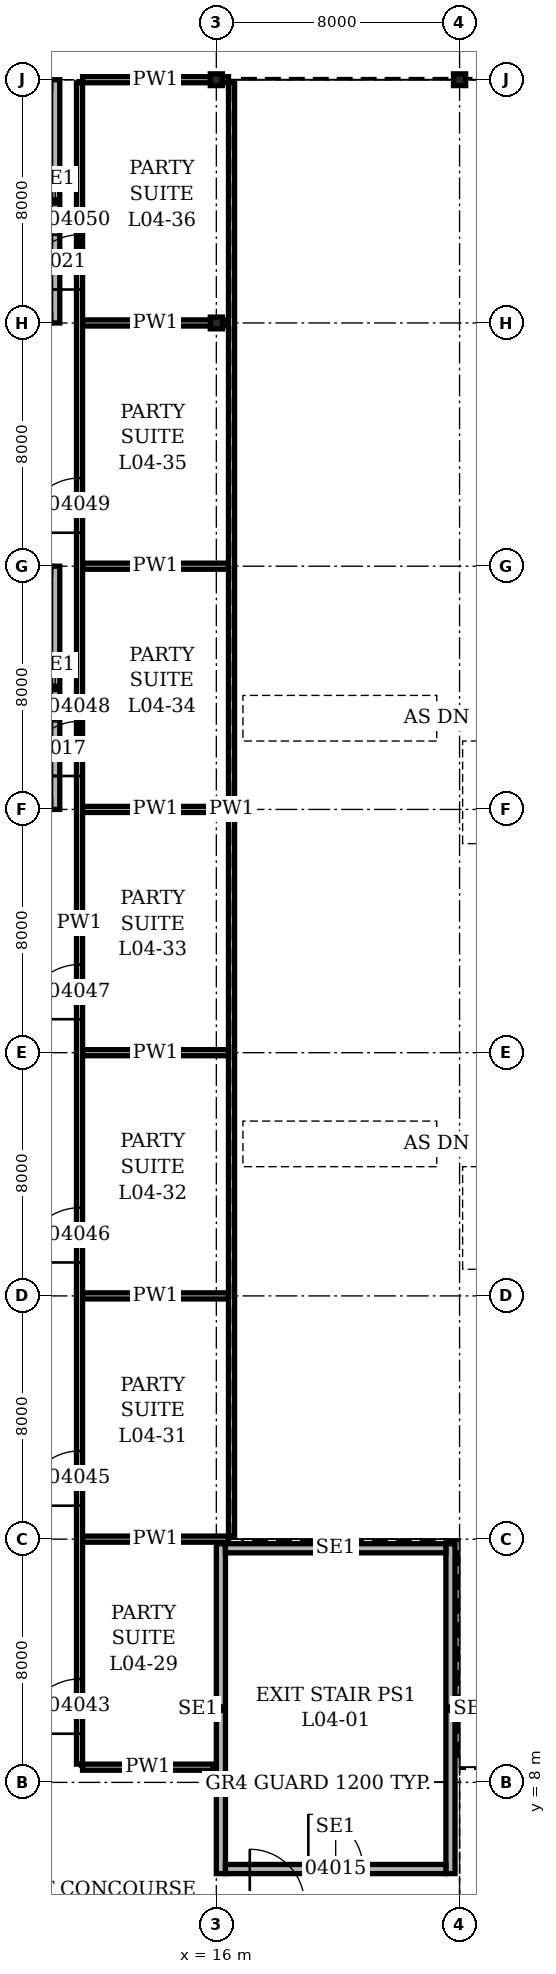
"""IFC4 building model, lengths in metres.
Left out: names, types, materials, properties, quantities, classifications, styles, units other than length and angle.
Written with IfcOpenShell. Run it as: python <this file> out.ifc"""

import sys

from ifc_helpers import new_model, si_unit, direction, frame, frame_2d, origin, origin_2d, place, context, subcontext, project, spatial, rectangle, i_section, extrude, element, fill, save


model = new_model("IFC4")
c1 = context("Model", 3, precision=1e-05, world=origin(), true_north=direction((0.0, 1.0)))
c2 = subcontext(c1, "Body", "Model", "MODEL_VIEW")
j1 = project(units=[si_unit("LENGTHUNIT", "METRE"), si_unit("PLANEANGLEUNIT", "RADIAN")], contexts=[c1])
p1 = place(None, origin())
s1 = spatial("IfcSite", under=j1, at=p1, CompositionType="ELEMENT")
p2 = place(p1, origin())
s2 = spatial("IfcBuilding", under=s1, at=p2, CompositionType="ELEMENT")
p3 = place(p2, frame((0.0, 0.0, 19.9)))
s3 = spatial("IfcBuildingStorey", under=s2, at=p3, CompositionType="ELEMENT", Elevation=19.9)
for number, where, z_axis, x_axis in (
    (1, (16.0, 56.0, 0.0), (0.0, 0.0, 1.0), (1.0, 0.0, 0.0)),
    (2, (16.0, 64.0, 0.0), (0.0, 0.0, 1.0), (1.0, 0.0, 0.0)),
    (3, (24.0, 64.0, 0.0), (0.0, 0.0, 1.0), (1.0, 0.0, 0.0)),
):
    element("IfcColumn", number, at=place(p3, frame(where, z_axis=z_axis, x_axis=x_axis)), inside=s3, PredefinedType="COLUMN", context=c2, shape_type="SweptSolid", body=[
        extrude(i_section(OverallWidth=0.399, OverallDepth=0.386, WebThickness=0.021, FlangeThickness=0.033, at=origin_2d()), origin(), (0.0, 0.0, 1.0), 6.0),
    ])
for number, where, z_axis, x_axis in (
    (4, (16.15, 5.0, 0.0), (0.0, 0.0, 1.0), (0.0, 1.0, 0.0)),
    (5, (23.7, 5.0, 0.0), (0.0, 0.0, 1.0), (0.0, 1.0, 0.0)),
):
    element("IfcWall", number, at=place(p3, frame(where, z_axis=z_axis, x_axis=x_axis)), inside=s3, PredefinedType="SOLIDWALL", context=c2, shape_type="SweptSolid", body=[
        extrude(rectangle(XDim=10.85, YDim=0.3, at=frame_2d((5.425, 0.0))), origin(), (0.0, 0.0, 1.0), 5.75),
    ])
p4 = place(p3, frame((16.3, 5.15, 0.0), z_axis=(0.0, 0.0, 1.0), x_axis=(1.0, 0.0, 0.0)))
e6 = element("IfcWall", 6, at=p4, inside=s3, PredefinedType="SOLIDWALL", context=c2, shape_type="SweptSolid", body=[
    extrude(rectangle(XDim=7.25, YDim=0.3, at=frame_2d((3.625, 0.0))), origin(), (0.0, 0.0, 1.0), 5.75),
])
p5 = place(p4, frame((2.725, 0.0, 0.0)))
e7 = element("IfcOpeningElement", 7, at=p5, cuts=e6, PredefinedType="OPENING", context=c2, shape_type="SweptSolid", body=[
    extrude(rectangle(XDim=1.8, YDim=2.1, at=frame_2d((0.9, 1.05))), frame((0.0, 0.16, 0.0), z_axis=(0.0, -1.0, 0.0), x_axis=(1.0, 0.0, 0.0)), (0.0, 0.0, 1.0), 0.32),
])
p6 = place(p3, frame((16.3, 15.7, 0.0), z_axis=(0.0, 0.0, 1.0), x_axis=(1.0, 0.0, 0.0)))
e8 = element("IfcWall", 8, at=p6, inside=s3, PredefinedType="SOLIDWALL", context=c2, shape_type="SweptSolid", body=[
    extrude(rectangle(XDim=7.25, YDim=0.3, at=frame_2d((3.625, 0.0))), origin(), (0.0, 0.0, 1.0), 5.75),
])
p7 = place(p3, frame((10.7, 40.0, 0.0), z_axis=(0.0, 0.0, 1.0), x_axis=(0.0, 1.0, 0.0)))
e9 = element("IfcWall", 9, at=p7, inside=s3, PredefinedType="SOLIDWALL", context=c2, shape_type="SweptSolid", body=[
    extrude(rectangle(XDim=8.0, YDim=0.3, at=frame_2d((4.0, 0.0))), origin(), (0.0, 0.0, 1.0), 5.75),
])
p8 = place(p7, frame((1.1, 0.0, 0.0)))
e10 = element("IfcOpeningElement", 10, at=p8, cuts=e9, PredefinedType="OPENING", context=c2, shape_type="SweptSolid", body=[
    extrude(rectangle(XDim=1.8, YDim=2.1, at=frame_2d((0.9, 1.05))), frame((0.0, 0.16, 0.0), z_axis=(0.0, -1.0, 0.0), x_axis=(1.0, 0.0, 0.0)), (0.0, 0.0, 1.0), 0.32),
])
p9 = place(p3, frame((10.7, 56.0, 0.0), z_axis=(0.0, 0.0, 1.0), x_axis=(0.0, 1.0, 0.0)))
e11 = element("IfcWall", 11, at=p9, inside=s3, PredefinedType="SOLIDWALL", context=c2, shape_type="SweptSolid", body=[
    extrude(rectangle(XDim=8.0, YDim=0.3, at=frame_2d((4.0, 0.0))), origin(), (0.0, 0.0, 1.0), 5.75),
])
p10 = place(p9, frame((1.1, 0.0, 0.0)))
e12 = element("IfcOpeningElement", 12, at=p10, cuts=e11, PredefinedType="OPENING", context=c2, shape_type="SweptSolid", body=[
    extrude(rectangle(XDim=1.8, YDim=2.1, at=frame_2d((0.9, 1.05))), frame((0.0, 0.16, 0.0), z_axis=(0.0, -1.0, 0.0), x_axis=(1.0, 0.0, 0.0)), (0.0, 0.0, 1.0), 0.32),
])
p11 = place(p3, frame((11.6, 8.5, 0.0), z_axis=(0.0, 0.0, 1.0), x_axis=(1.0, 0.0, 0.0)))
e13 = element("IfcWall", 13, at=p11, inside=s3, PredefinedType="PARTITIONING", context=c2, shape_type="SweptSolid", body=[
    extrude(rectangle(XDim=4.3, YDim=0.2, at=frame_2d((2.15, 0.0))), origin(), (0.0, 0.0, 1.0), 5.75),
])
for number, where, z_axis, x_axis in (
    (14, (11.6, 16.0, 0.0), (0.0, 0.0, 1.0), (1.0, 0.0, 0.0)),
    (15, (11.6, 24.0, 0.0), (0.0, 0.0, 1.0), (1.0, 0.0, 0.0)),
    (16, (11.6, 32.0, 0.0), (0.0, 0.0, 1.0), (1.0, 0.0, 0.0)),
    (17, (11.6, 40.0, 0.0), (0.0, 0.0, 1.0), (1.0, 0.0, 0.0)),
    (18, (11.6, 48.0, 0.0), (0.0, 0.0, 1.0), (1.0, 0.0, 0.0)),
):
    element("IfcWall", number, at=place(p3, frame(where, z_axis=z_axis, x_axis=x_axis)), inside=s3, PredefinedType="PARTITIONING", context=c2, shape_type="SweptSolid", body=[
        extrude(rectangle(XDim=4.8, YDim=0.2, at=frame_2d((2.4, 0.0))), origin(), (0.0, 0.0, 1.0), 5.75),
    ])
for number, where, z_axis, x_axis in (
    (19, (11.6, 56.0, 0.0), (0.0, 0.0, 1.0), (1.0, 0.0, 0.0)),
    (20, (11.6, 64.0, 0.0), (0.0, 0.0, 1.0), (1.0, 0.0, 0.0)),
):
    element("IfcWall", number, at=place(p3, frame(where, z_axis=z_axis, x_axis=x_axis)), inside=s3, PredefinedType="PARTITIONING", context=c2, shape_type="SweptSolid", body=[
        extrude(rectangle(XDim=4.8, YDim=0.2, at=frame_2d((2.4, 0.0))), origin(), (0.0, 0.0, 1.0), 4.978),
    ])
p12 = place(p3, frame((11.5, 8.6, 0.0), z_axis=(0.0, 0.0, 1.0), x_axis=(0.0, 1.0, 0.0)))
e21 = element("IfcWall", 21, at=p12, inside=s3, PredefinedType="PARTITIONING", context=c2, shape_type="SweptSolid", body=[
    extrude(rectangle(XDim=55.3, YDim=0.2, at=frame_2d((27.65, 0.0))), origin(), (0.0, 0.0, 1.0), 5.75),
])
p13 = place(p12, frame((1.0, 0.0, 0.0)))
e22 = element("IfcOpeningElement", 22, at=p13, cuts=e21, PredefinedType="OPENING", context=c2, shape_type="SweptSolid", body=[
    extrude(rectangle(XDim=1.8, YDim=2.4, at=frame_2d((0.9, 1.2))), frame((0.0, 0.11, 0.0), z_axis=(0.0, -1.0, 0.0), x_axis=(1.0, 0.0, 0.0)), (0.0, 0.0, 1.0), 0.22),
])
p14 = place(p12, frame((8.5, 0.0, 0.0)))
e23 = element("IfcOpeningElement", 23, at=p14, cuts=e21, PredefinedType="OPENING", context=c2, shape_type="SweptSolid", body=[
    extrude(rectangle(XDim=1.8, YDim=2.4, at=frame_2d((0.9, 1.2))), frame((0.0, 0.11, 0.0), z_axis=(0.0, -1.0, 0.0), x_axis=(1.0, 0.0, 0.0)), (0.0, 0.0, 1.0), 0.22),
])
p15 = place(p12, frame((16.5, 0.0, 0.0)))
e24 = element("IfcOpeningElement", 24, at=p15, cuts=e21, PredefinedType="OPENING", context=c2, shape_type="SweptSolid", body=[
    extrude(rectangle(XDim=1.8, YDim=2.4, at=frame_2d((0.9, 1.2))), frame((0.0, 0.11, 0.0), z_axis=(0.0, -1.0, 0.0), x_axis=(1.0, 0.0, 0.0)), (0.0, 0.0, 1.0), 0.22),
])
p16 = place(p12, frame((24.5, 0.0, 0.0)))
e25 = element("IfcOpeningElement", 25, at=p16, cuts=e21, PredefinedType="OPENING", context=c2, shape_type="SweptSolid", body=[
    extrude(rectangle(XDim=1.8, YDim=2.4, at=frame_2d((0.9, 1.2))), frame((0.0, 0.11, 0.0), z_axis=(0.0, -1.0, 0.0), x_axis=(1.0, 0.0, 0.0)), (0.0, 0.0, 1.0), 0.22),
])
p17 = place(p12, frame((32.5, 0.0, 0.0)))
e26 = element("IfcOpeningElement", 26, at=p17, cuts=e21, PredefinedType="OPENING", context=c2, shape_type="SweptSolid", body=[
    extrude(rectangle(XDim=1.8, YDim=2.4, at=frame_2d((0.9, 1.2))), frame((0.0, 0.11, 0.0), z_axis=(0.0, -1.0, 0.0), x_axis=(1.0, 0.0, 0.0)), (0.0, 0.0, 1.0), 0.22),
])
p18 = place(p12, frame((40.5, 0.0, 0.0)))
e27 = element("IfcOpeningElement", 27, at=p18, cuts=e21, PredefinedType="OPENING", context=c2, shape_type="SweptSolid", body=[
    extrude(rectangle(XDim=1.8, YDim=2.4, at=frame_2d((0.9, 1.2))), frame((0.0, 0.11, 0.0), z_axis=(0.0, -1.0, 0.0), x_axis=(1.0, 0.0, 0.0)), (0.0, 0.0, 1.0), 0.22),
])
p19 = place(p12, frame((48.5, 0.0, 0.0)))
e28 = element("IfcOpeningElement", 28, at=p19, cuts=e21, PredefinedType="OPENING", context=c2, shape_type="SweptSolid", body=[
    extrude(rectangle(XDim=1.8, YDim=2.4, at=frame_2d((0.9, 1.2))), frame((0.0, 0.11, 0.0), z_axis=(0.0, -1.0, 0.0), x_axis=(1.0, 0.0, 0.0)), (0.0, 0.0, 1.0), 0.22),
])
p20 = place(p3, frame((16.5, 16.1, 0.0), z_axis=(0.0, 0.0, 1.0), x_axis=(0.0, 1.0, 0.0)))
e29 = element("IfcWall", 29, at=p20, inside=s3, PredefinedType="PARTITIONING", context=c2, shape_type="SweptSolid", body=[
    extrude(rectangle(XDim=47.8, YDim=0.2, at=frame_2d((23.9, 0.0))), origin(), (0.0, 0.0, 1.0), 5.75),
])
p21 = place(p5, origin())
e30 = element("IfcDoor", 30, at=p21, inside=s3, OperationType="DOUBLE_DOOR_SINGLE_SWING", PredefinedType="DOOR", context=c2, shape_type="SweptSolid", body=[
    extrude(rectangle(XDim=1.8, YDim=2.1, at=frame_2d((0.9, 1.05))), frame((0.0, 0.15, 0.0), z_axis=(0.0, -1.0, 0.0), x_axis=(1.0, 0.0, 0.0)), (0.0, 0.0, 1.0), 0.3),
])
fill(e7, e30)
p22 = place(p8, origin())
e31 = element("IfcDoor", 31, at=p22, inside=s3, OperationType="DOUBLE_DOOR_SINGLE_SWING", PredefinedType="DOOR", context=c2, shape_type="SweptSolid", body=[
    extrude(rectangle(XDim=1.8, YDim=2.1, at=frame_2d((0.9, 1.05))), frame((0.0, 0.15, 0.0), z_axis=(0.0, -1.0, 0.0), x_axis=(1.0, 0.0, 0.0)), (0.0, 0.0, 1.0), 0.3),
])
fill(e10, e31)
p23 = place(p10, origin())
e32 = element("IfcDoor", 32, at=p23, inside=s3, OperationType="DOUBLE_DOOR_SINGLE_SWING", PredefinedType="DOOR", context=c2, shape_type="SweptSolid", body=[
    extrude(rectangle(XDim=1.8, YDim=2.1, at=frame_2d((0.9, 1.05))), frame((0.0, 0.15, 0.0), z_axis=(0.0, -1.0, 0.0), x_axis=(1.0, 0.0, 0.0)), (0.0, 0.0, 1.0), 0.3),
])
fill(e12, e32)
p24 = place(p13, origin())
e33 = element("IfcDoor", 33, at=p24, inside=s3, OperationType="DOUBLE_DOOR_DOUBLE_SWING", PredefinedType="DOOR", context=c2, shape_type="SweptSolid", body=[
    extrude(rectangle(XDim=1.8, YDim=2.4, at=frame_2d((0.9, 1.2))), frame((0.0, 0.1, 0.0), z_axis=(0.0, -1.0, 0.0), x_axis=(1.0, 0.0, 0.0)), (0.0, 0.0, 1.0), 0.199),
])
fill(e22, e33)
p25 = place(p14, origin())
e34 = element("IfcDoor", 34, at=p25, inside=s3, OperationType="DOUBLE_DOOR_DOUBLE_SWING", PredefinedType="DOOR", context=c2, shape_type="SweptSolid", body=[
    extrude(rectangle(XDim=1.8, YDim=2.4, at=frame_2d((0.9, 1.2))), frame((0.0, 0.1, 0.0), z_axis=(0.0, -1.0, 0.0), x_axis=(1.0, 0.0, 0.0)), (0.0, 0.0, 1.0), 0.199),
])
fill(e23, e34)
p26 = place(p15, origin())
e35 = element("IfcDoor", 35, at=p26, inside=s3, OperationType="DOUBLE_DOOR_DOUBLE_SWING", PredefinedType="DOOR", context=c2, shape_type="SweptSolid", body=[
    extrude(rectangle(XDim=1.8, YDim=2.4, at=frame_2d((0.9, 1.2))), frame((0.0, 0.1, 0.0), z_axis=(0.0, -1.0, 0.0), x_axis=(1.0, 0.0, 0.0)), (0.0, 0.0, 1.0), 0.199),
])
fill(e24, e35)
p27 = place(p16, origin())
e36 = element("IfcDoor", 36, at=p27, inside=s3, OperationType="DOUBLE_DOOR_DOUBLE_SWING", PredefinedType="DOOR", context=c2, shape_type="SweptSolid", body=[
    extrude(rectangle(XDim=1.8, YDim=2.4, at=frame_2d((0.9, 1.2))), frame((0.0, 0.1, 0.0), z_axis=(0.0, -1.0, 0.0), x_axis=(1.0, 0.0, 0.0)), (0.0, 0.0, 1.0), 0.199),
])
fill(e25, e36)
p28 = place(p17, origin())
e37 = element("IfcDoor", 37, at=p28, inside=s3, OperationType="DOUBLE_DOOR_DOUBLE_SWING", PredefinedType="DOOR", context=c2, shape_type="SweptSolid", body=[
    extrude(rectangle(XDim=1.8, YDim=2.4, at=frame_2d((0.9, 1.2))), frame((0.0, 0.1, 0.0), z_axis=(0.0, -1.0, 0.0), x_axis=(1.0, 0.0, 0.0)), (0.0, 0.0, 1.0), 0.199),
])
fill(e26, e37)
p29 = place(p18, origin())
e38 = element("IfcDoor", 38, at=p29, inside=s3, OperationType="DOUBLE_DOOR_DOUBLE_SWING", PredefinedType="DOOR", context=c2, shape_type="SweptSolid", body=[
    extrude(rectangle(XDim=1.8, YDim=2.4, at=frame_2d((0.9, 1.2))), frame((0.0, 0.1, 0.0), z_axis=(0.0, -1.0, 0.0), x_axis=(1.0, 0.0, 0.0)), (0.0, 0.0, 1.0), 0.199),
])
fill(e27, e38)
p30 = place(p19, origin())
e39 = element("IfcDoor", 39, at=p30, inside=s3, OperationType="DOUBLE_DOOR_DOUBLE_SWING", PredefinedType="DOOR", context=c2, shape_type="SweptSolid", body=[
    extrude(rectangle(XDim=1.8, YDim=2.4, at=frame_2d((0.9, 1.2))), frame((0.0, 0.1, 0.0), z_axis=(0.0, -1.0, 0.0), x_axis=(1.0, 0.0, 0.0)), (0.0, 0.0, 1.0), 0.199),
])
fill(e28, e39)
save(model, sys.argv[1])
